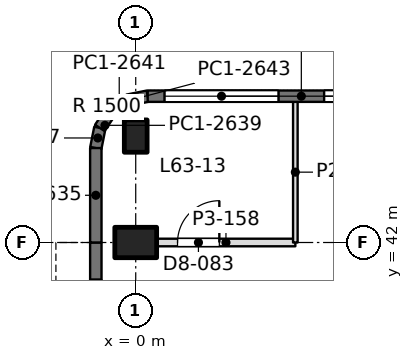
"""IFC4 building model, lengths in metres.
Left out: names, types, materials, properties, quantities, classifications, styles, units other than length and angle.
Written with IfcOpenShell. Run it as: python <this file> out.ifc"""

import sys

from ifc_helpers import new_model, si_unit, direction, frame, frame_2d, origin, origin_2d, place, context, subcontext, project, spatial, rectangle, extrude, element, fill, save


model = new_model("IFC4")
c1 = context("Model", 3, precision=1e-05, world=origin(), true_north=direction((0.0, 1.0)))
c2 = subcontext(c1, "Body", "Model", "MODEL_VIEW")
j1 = project(units=[si_unit("LENGTHUNIT", "METRE"), si_unit("PLANEANGLEUNIT", "RADIAN")], contexts=[c1])
p1 = place(None, origin())
s1 = spatial("IfcSite", under=j1, at=p1, CompositionType="ELEMENT")
p2 = place(p1, origin())
s2 = spatial("IfcBuilding", under=s1, at=p2, CompositionType="ELEMENT")
p3 = place(p2, frame((0.0, 0.0, 277.2)))
s3 = spatial("IfcBuildingStorey", under=s2, at=p3, CompositionType="ELEMENT", Elevation=277.2)
p4 = place(p3, frame((0.0, 42.0, 0.0), z_axis=(0.0, 0.0, 1.0), x_axis=(0.0, 1.0, 0.0)))
e1 = element("IfcColumn", 1, at=p4, inside=s3, PredefinedType="COLUMN", context=c2, shape_type="SweptSolid", body=[
    extrude(rectangle(XDim=0.8, YDim=1.1, at=origin_2d()), origin(), (0.0, 0.0, 1.0), 4.5),
])
p5 = place(p3, frame((0.0, 44.8, 0.0), z_axis=(0.0, 0.0, 1.0), x_axis=(1.0, 0.0, 0.0)))
e2 = element("IfcColumn", 2, at=p5, inside=s3, PredefinedType="COLUMN", context=c2, shape_type="SweptSolid", body=[
    extrude(rectangle(XDim=0.6, YDim=0.85, at=origin_2d()), origin(), (0.0, 0.0, 1.0), 4.5),
])
p6 = place(p3, frame((-1.05, 37.65, 0.0), z_axis=(0.0, 0.0, 1.0), x_axis=(0.0, 1.0, 0.0)))
e3 = element("IfcWall", 3, at=p6, inside=s3, PredefinedType="SOLIDWALL", context=c2, shape_type="SweptSolid", body=[
    extrude(rectangle(XDim=4.35, YDim=0.3, at=frame_2d((2.175, 0.0))), origin(), (0.0, 0.0, 1.0), 4.3),
])
p7 = place(p6, frame((0.975, 0.0, 0.9)))
e4 = element("IfcOpeningElement", 4, at=p7, cuts=e3, PredefinedType="OPENING", context=c2, shape_type="SweptSolid", body=[
    extrude(rectangle(XDim=2.4, YDim=1.9, at=frame_2d((1.2, 0.95))), frame((0.0, 0.16, 0.0), z_axis=(0.0, -1.0, 0.0), x_axis=(1.0, 0.0, 0.0)), (0.0, 0.0, 1.0), 0.32),
])
p8 = place(p3, frame((-1.05, 42.0, 0.0), z_axis=(0.0, 0.0, 1.0), x_axis=(0.0, 1.0, 0.0)))
e5 = element("IfcWall", 5, at=p8, inside=s3, PredefinedType="SOLIDWALL", context=c2, shape_type="SweptSolid", body=[
    extrude(rectangle(XDim=2.485, YDim=0.3, at=frame_2d((1.243, 0.0))), origin(), (0.0, 0.0, 1.0), 4.3),
])
p9 = place(p3, frame((-1.05, 44.485, 0.0), z_axis=(0.0, 0.0, 1.0), x_axis=(0.195073962632, 0.980788534345, 0.0)))
e6 = element("IfcWall", 6, at=p9, inside=s3, PredefinedType="SOLIDWALL", context=c2, shape_type="SweptSolid", body=[
    extrude(rectangle(XDim=0.541, YDim=0.3, at=frame_2d((0.271, 0.0))), origin(), (0.0, 0.0, 1.0), 4.3),
])
p10 = place(p3, frame((-0.945, 45.015, 0.0), z_axis=(0.0, 0.0, 1.0), x_axis=(0.55534295404, 0.831621430339, 0.0)))
e7 = element("IfcWall", 7, at=p10, inside=s3, PredefinedType="SOLIDWALL", context=c2, shape_type="SweptSolid", body=[
    extrude(rectangle(XDim=0.526, YDim=0.3, at=frame_2d((0.263, 0.0))), origin(), (0.0, 0.0, 1.0), 4.3),
])
p11 = place(p3, frame((-0.653, 45.453, 0.0), z_axis=(0.0, 0.0, 1.0), x_axis=(0.831692711774, 0.555236195849, 0.0)))
e8 = element("IfcWall", 8, at=p11, inside=s3, PredefinedType="SOLIDWALL", context=c2, shape_type="SweptSolid", body=[
    extrude(rectangle(XDim=0.525, YDim=0.3, at=frame_2d((0.263, 0.0))), origin(), (0.0, 0.0, 1.0), 4.3),
])
p12 = place(p3, frame((-0.216, 45.744, 0.0), z_axis=(0.0, 0.0, 1.0), x_axis=(0.980702050465, 0.1955082817, 0.0)))
e9 = element("IfcWall", 9, at=p12, inside=s3, PredefinedType="SOLIDWALL", context=c2, shape_type="SweptSolid", body=[
    extrude(rectangle(XDim=0.541, YDim=0.3, at=frame_2d((0.271, 0.0))), origin(), (0.0, 0.0, 1.0), 4.3),
])
p13 = place(p3, frame((0.315, 45.85, 0.0), z_axis=(0.0, 0.0, 1.0), x_axis=(1.0, 0.0, 0.0)))
e10 = element("IfcWall", 10, at=p13, inside=s3, PredefinedType="SOLIDWALL", context=c2, shape_type="SweptSolid", body=[
    extrude(rectangle(XDim=8.085, YDim=0.3, at=frame_2d((4.042, 0.0))), origin(), (0.0, 0.0, 1.0), 4.3),
])
p14 = place(p13, frame((0.443, 0.0, 0.9)))
e11 = element("IfcOpeningElement", 11, at=p14, cuts=e10, PredefinedType="OPENING", context=c2, shape_type="SweptSolid", body=[
    extrude(rectangle(XDim=3.0, YDim=2.4, at=frame_2d((1.5, 1.2))), frame((0.0, 0.16, 0.0), z_axis=(0.0, -1.0, 0.0), x_axis=(1.0, 0.0, 0.0)), (0.0, 0.0, 1.0), 0.32),
])
p15 = place(p13, frame((4.643, 0.0, 0.9)))
e12 = element("IfcOpeningElement", 12, at=p15, cuts=e10, PredefinedType="OPENING", context=c2, shape_type="SweptSolid", body=[
    extrude(rectangle(XDim=3.0, YDim=2.4, at=frame_2d((1.5, 1.2))), frame((0.0, 0.16, 0.0), z_axis=(0.0, -1.0, 0.0), x_axis=(1.0, 0.0, 0.0)), (0.0, 0.0, 1.0), 0.32),
])
p16 = place(p3, frame((0.549, 42.0, 0.0), z_axis=(0.0, 0.0, 1.0), x_axis=(1.0, 0.0, 0.0)))
e13 = element("IfcWall", 13, at=p16, inside=s3, PredefinedType="PARTITIONING", context=c2, shape_type="SweptSolid", body=[
    extrude(rectangle(XDim=3.651, YDim=0.2, at=frame_2d((1.825, 0.0))), origin(), (0.0, 0.0, 1.0), 3.292),
])
p17 = place(p16, frame((0.551, 0.0, 0.0)))
e14 = element("IfcOpeningElement", 14, at=p17, cuts=e13, PredefinedType="OPENING", context=c2, shape_type="SweptSolid", body=[
    extrude(rectangle(XDim=1.1, YDim=2.4, at=frame_2d((0.55, 1.2))), frame((0.0, 0.11, 0.0), z_axis=(0.0, -1.0, 0.0), x_axis=(1.0, 0.0, 0.0)), (0.0, 0.0, 1.0), 0.22),
])
p18 = place(p3, frame((4.2, 42.0, 0.0), z_axis=(0.0, 0.0, 1.0), x_axis=(0.0, 1.0, 0.0)))
e15 = element("IfcWall", 15, at=p18, inside=s3, PredefinedType="PARTITIONING", context=c2, shape_type="SweptSolid", body=[
    extrude(rectangle(XDim=3.702, YDim=0.12, at=frame_2d((1.851, 0.0))), origin(), (0.0, 0.0, 1.0), 3.292),
])
p19 = place(p7, origin())
e16 = element("IfcWindow", 16, at=p19, inside=s3, PartitioningType="SINGLE_PANEL", PredefinedType="WINDOW", context=c2, shape_type="SweptSolid", body=[
    extrude(rectangle(XDim=2.4, YDim=1.9, at=frame_2d((1.2, 0.95))), frame((0.0, 0.03, 0.0), z_axis=(0.0, -1.0, 0.0), x_axis=(1.0, 0.0, 0.0)), (0.0, 0.0, 1.0), 0.06),
])
fill(e4, e16)
p20 = place(p14, origin())
e17 = element("IfcWindow", 17, at=p20, inside=s3, PartitioningType="SINGLE_PANEL", PredefinedType="WINDOW", context=c2, shape_type="SweptSolid", body=[
    extrude(rectangle(XDim=3.0, YDim=2.4, at=frame_2d((1.5, 1.2))), frame((0.0, 0.03, 0.0), z_axis=(0.0, -1.0, 0.0), x_axis=(1.0, 0.0, 0.0)), (0.0, 0.0, 1.0), 0.06),
])
fill(e11, e17)
p21 = place(p15, origin())
e18 = element("IfcWindow", 18, at=p21, inside=s3, PartitioningType="SINGLE_PANEL", PredefinedType="WINDOW", context=c2, shape_type="SweptSolid", body=[
    extrude(rectangle(XDim=3.0, YDim=2.4, at=frame_2d((1.5, 1.2))), frame((0.0, 0.03, 0.0), z_axis=(0.0, -1.0, 0.0), x_axis=(1.0, 0.0, 0.0)), (0.0, 0.0, 1.0), 0.06),
])
fill(e12, e18)
p22 = place(p17, origin())
e19 = element("IfcDoor", 19, at=p22, inside=s3, OperationType="SINGLE_SWING_RIGHT", PredefinedType="DOOR", context=c2, shape_type="SweptSolid", body=[
    extrude(rectangle(XDim=1.1, YDim=2.4, at=frame_2d((0.55, 1.2))), frame((0.0, 0.025, 0.0), z_axis=(0.0, -1.0, 0.0), x_axis=(1.0, 0.0, 0.0)), (0.0, 0.0, 1.0), 0.05),
])
fill(e14, e19)
save(model, sys.argv[1])
